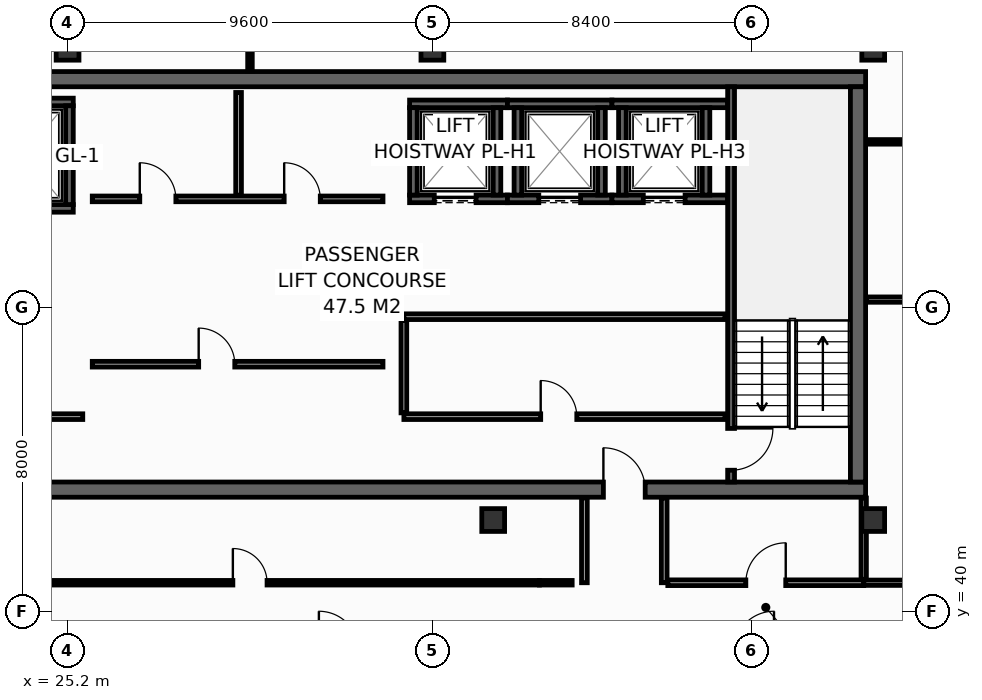
"""IFC4 building model, lengths in metres.
Left out: names, types, materials, properties, quantities, classifications, styles, units other than length and angle.
Written with IfcOpenShell. Run it as: python <this file> out.ifc"""

import sys

from ifc_helpers import new_model, si_unit, direction, frame, frame_2d, origin, origin_2d, place, context, subcontext, project, spatial, rectangle, hollow_rectangle, extrude, element, fill, save


model = new_model("IFC4")
c1 = context("Model", 3, precision=1e-05, world=origin(), true_north=direction((0.0, 1.0)))
c2 = subcontext(c1, "Body", "Model", "MODEL_VIEW")
j1 = project(units=[si_unit("LENGTHUNIT", "METRE"), si_unit("PLANEANGLEUNIT", "RADIAN")], contexts=[c1])
p1 = place(None, origin())
s1 = spatial("IfcSite", under=j1, at=p1, CompositionType="ELEMENT")
p2 = place(p1, origin())
s2 = spatial("IfcBuilding", under=s1, at=p2, CompositionType="ELEMENT")
p3 = place(p2, frame((0.0, 0.0, 272.4)))
s3 = spatial("IfcBuildingStorey", under=s2, at=p3, CompositionType="ELEMENT", Elevation=272.4)
p4 = place(p3, frame((13.7, 43.2, 0.0), z_axis=(0.0, 0.0, 1.0), x_axis=(1.0, 0.0, 0.0)))
e1 = element("IfcWall", 1, at=p4, inside=s3, PredefinedType="SHEAR", context=c2, shape_type="SweptSolid", body=[
    extrude(rectangle(XDim=32.5, YDim=0.4, at=frame_2d((16.25, 0.0))), origin(), (0.0, 0.0, 1.0), 3.35),
])
p5 = place(p4, frame((5.4, 0.0, 0.0)))
e2 = element("IfcOpeningElement", 2, at=p5, cuts=e1, PredefinedType="OPENING", context=c2, shape_type="SweptSolid", body=[
    extrude(rectangle(XDim=1.1, YDim=2.15, at=frame_2d((0.55, 1.075))), frame((0.0, 0.21, 0.0), z_axis=(0.0, -1.0, 0.0), x_axis=(1.0, 0.0, 0.0)), (0.0, 0.0, 1.0), 0.42),
])
p6 = place(p4, frame((25.6, 0.0, 0.0)))
e3 = element("IfcOpeningElement", 3, at=p6, cuts=e1, PredefinedType="OPENING", context=c2, shape_type="SweptSolid", body=[
    extrude(rectangle(XDim=1.1, YDim=2.15, at=frame_2d((0.55, 1.075))), frame((0.0, 0.21, 0.0), z_axis=(0.0, -1.0, 0.0), x_axis=(1.0, 0.0, 0.0)), (0.0, 0.0, 1.0), 0.42),
])
p7 = place(p3, frame((13.7, 54.0, 0.0), z_axis=(0.0, 0.0, 1.0), x_axis=(1.0, 0.0, 0.0)))
e4 = element("IfcWall", 4, at=p7, inside=s3, PredefinedType="SHEAR", context=c2, shape_type="SweptSolid", body=[
    extrude(rectangle(XDim=32.5, YDim=0.4, at=frame_2d((16.25, 0.0))), origin(), (0.0, 0.0, 1.0), 3.35),
])
p8 = place(p3, frame((46.0, 43.4, 0.0), z_axis=(0.0, 0.0, 1.0), x_axis=(0.0, 1.0, 0.0)))
e5 = element("IfcWall", 5, at=p8, inside=s3, PredefinedType="SHEAR", context=c2, shape_type="SweptSolid", body=[
    extrude(rectangle(XDim=10.4, YDim=0.4, at=frame_2d((5.2, 0.0))), origin(), (0.0, 0.0, 1.0), 3.35),
])
for number, where, z_axis, x_axis in (
    (6, (25.2, 54.8, 0.0), (0.0, 0.0, 1.0), (1.0, 0.0, 0.0)),
    (7, (34.8, 54.8, 0.0), (0.0, 0.0, 1.0), (1.0, 0.0, 0.0)),
    (8, (46.4, 54.8, 0.0), (0.0, 0.0, 1.0), (1.0, 0.0, 0.0)),
    (9, (36.4, 42.4, 0.0), (0.0, 0.0, 1.0), (1.0, 0.0, 0.0)),
    (10, (46.4, 42.4, 0.0), (0.0, 0.0, 1.0), (1.0, 0.0, 0.0)),
):
    element("IfcColumn", number, at=place(p3, frame(where, z_axis=z_axis, x_axis=x_axis)), inside=s3, PredefinedType="COLUMN", context=c2, shape_type="SweptSolid", body=[
        extrude(hollow_rectangle(XDim=0.6, YDim=0.6, WallThickness=0.028, at=origin_2d()), origin(), (0.0, 0.0, 1.0), 3.8),
    ])
p9 = place(p3, frame((22.5, 50.6, 0.0), z_axis=(0.0, 0.0, 1.0), x_axis=(1.0, 0.0, 0.0)))
e11 = element("IfcWall", 11, at=p9, inside=s3, PredefinedType="SHEAR", context=c2, shape_type="SweptSolid", body=[
    extrude(rectangle(XDim=2.85, YDim=0.2, at=frame_2d((1.425, 0.0))), origin(), (0.0, 0.0, 1.0), 3.35),
])
p10 = place(p9, frame((0.925, 0.0, 0.0)))
e12 = element("IfcOpeningElement", 12, at=p10, cuts=e11, PredefinedType="OPENING", context=c2, shape_type="SweptSolid", body=[
    extrude(rectangle(XDim=1.25, YDim=2.3, at=frame_2d((0.625, 1.15))), frame((0.0, 0.11, 0.0), z_axis=(0.0, -1.0, 0.0), x_axis=(1.0, 0.0, 0.0)), (0.0, 0.0, 1.0), 0.22),
])
p11 = place(p3, frame((22.5, 53.4, 0.0), z_axis=(0.0, 0.0, 1.0), x_axis=(1.0, 0.0, 0.0)))
e13 = element("IfcWall", 13, at=p11, inside=s3, PredefinedType="SHEAR", context=c2, shape_type="SweptSolid", body=[
    extrude(rectangle(XDim=2.85, YDim=0.2, at=frame_2d((1.425, 0.0))), origin(), (0.0, 0.0, 1.0), 3.35),
])
p12 = place(p3, frame((25.25, 50.7, 0.0), z_axis=(0.0, 0.0, 1.0), x_axis=(0.0, 1.0, 0.0)))
e14 = element("IfcWall", 14, at=p12, inside=s3, PredefinedType="SHEAR", context=c2, shape_type="SweptSolid", body=[
    extrude(rectangle(XDim=2.6, YDim=0.2, at=frame_2d((1.3, 0.0))), origin(), (0.0, 0.0, 1.0), 3.35),
])
p13 = place(p3, frame((34.2, 50.85, 0.0), z_axis=(0.0, 0.0, 1.0), x_axis=(1.0, 0.0, 0.0)))
e15 = element("IfcWall", 15, at=p13, inside=s3, PredefinedType="SHEAR", context=c2, shape_type="SweptSolid", body=[
    extrude(rectangle(XDim=2.575, YDim=0.2, at=frame_2d((1.288, 0.0))), origin(), (0.0, 0.0, 1.0), 3.35),
])
p14 = place(p13, frame((0.65, 0.0, 0.0)))
e16 = element("IfcOpeningElement", 16, at=p14, cuts=e15, PredefinedType="OPENING", context=c2, shape_type="SweptSolid", body=[
    extrude(rectangle(XDim=1.1, YDim=2.2, at=frame_2d((0.55, 1.1))), frame((0.0, 0.11, 0.0), z_axis=(0.0, -1.0, 0.0), x_axis=(1.0, 0.0, 0.0)), (0.0, 0.0, 1.0), 0.22),
])
p15 = place(p3, frame((34.2, 53.35, 0.0), z_axis=(0.0, 0.0, 1.0), x_axis=(1.0, 0.0, 0.0)))
e17 = element("IfcWall", 17, at=p15, inside=s3, PredefinedType="SHEAR", context=c2, shape_type="SweptSolid", body=[
    extrude(rectangle(XDim=2.575, YDim=0.2, at=frame_2d((1.288, 0.0))), origin(), (0.0, 0.0, 1.0), 3.35),
])
for number, where, z_axis, x_axis in (
    (18, (34.3, 50.95, 0.0), (0.0, 0.0, 1.0), (0.0, 1.0, 0.0)),
    (19, (36.5, 50.95, 0.0), (0.0, 0.0, 1.0), (0.0, 1.0, 0.0)),
):
    element("IfcWall", number, at=place(p3, frame(where, z_axis=z_axis, x_axis=x_axis)), inside=s3, PredefinedType="SHEAR", context=c2, shape_type="SweptSolid", body=[
        extrude(rectangle(XDim=2.3, YDim=0.2, at=frame_2d((1.15, 0.0))), origin(), (0.0, 0.0, 1.0), 3.35),
    ])
p16 = place(p3, frame((36.775, 50.85, 0.0), z_axis=(0.0, 0.0, 1.0), x_axis=(1.0, 0.0, 0.0)))
e20 = element("IfcWall", 20, at=p16, inside=s3, PredefinedType="SHEAR", context=c2, shape_type="SweptSolid", body=[
    extrude(rectangle(XDim=2.75, YDim=0.2, at=frame_2d((1.375, 0.0))), origin(), (0.0, 0.0, 1.0), 3.35),
])
p17 = place(p16, frame((0.825, 0.0, 0.0)))
e21 = element("IfcOpeningElement", 21, at=p17, cuts=e20, PredefinedType="OPENING", context=c2, shape_type="SweptSolid", body=[
    extrude(rectangle(XDim=1.1, YDim=2.2, at=frame_2d((0.55, 1.1))), frame((0.0, 0.11, 0.0), z_axis=(0.0, -1.0, 0.0), x_axis=(1.0, 0.0, 0.0)), (0.0, 0.0, 1.0), 0.22),
])
p18 = place(p3, frame((36.775, 53.35, 0.0), z_axis=(0.0, 0.0, 1.0), x_axis=(1.0, 0.0, 0.0)))
e22 = element("IfcWall", 22, at=p18, inside=s3, PredefinedType="SHEAR", context=c2, shape_type="SweptSolid", body=[
    extrude(rectangle(XDim=2.75, YDim=0.2, at=frame_2d((1.375, 0.0))), origin(), (0.0, 0.0, 1.0), 3.35),
])
for number, where, z_axis, x_axis in (
    (23, (37.05, 50.95, 0.0), (0.0, 0.0, 1.0), (0.0, 1.0, 0.0)),
    (24, (39.25, 50.95, 0.0), (0.0, 0.0, 1.0), (0.0, 1.0, 0.0)),
):
    element("IfcWall", number, at=place(p3, frame(where, z_axis=z_axis, x_axis=x_axis)), inside=s3, PredefinedType="SHEAR", context=c2, shape_type="SweptSolid", body=[
        extrude(rectangle(XDim=2.3, YDim=0.2, at=frame_2d((1.15, 0.0))), origin(), (0.0, 0.0, 1.0), 3.35),
    ])
p19 = place(p3, frame((39.525, 50.85, 0.0), z_axis=(0.0, 0.0, 1.0), x_axis=(1.0, 0.0, 0.0)))
e25 = element("IfcWall", 25, at=p19, inside=s3, PredefinedType="SHEAR", context=c2, shape_type="SweptSolid", body=[
    extrude(rectangle(XDim=3.045, YDim=0.2, at=frame_2d((1.522, 0.0))), origin(), (0.0, 0.0, 1.0), 3.35),
])
p20 = place(p19, frame((0.825, 0.0, 0.0)))
e26 = element("IfcOpeningElement", 26, at=p20, cuts=e25, PredefinedType="OPENING", context=c2, shape_type="SweptSolid", body=[
    extrude(rectangle(XDim=1.1, YDim=2.2, at=frame_2d((0.55, 1.1))), frame((0.0, 0.11, 0.0), z_axis=(0.0, -1.0, 0.0), x_axis=(1.0, 0.0, 0.0)), (0.0, 0.0, 1.0), 0.22),
])
p21 = place(p3, frame((39.525, 53.35, 0.0), z_axis=(0.0, 0.0, 1.0), x_axis=(1.0, 0.0, 0.0)))
e27 = element("IfcWall", 27, at=p21, inside=s3, PredefinedType="SHEAR", context=c2, shape_type="SweptSolid", body=[
    extrude(rectangle(XDim=3.045, YDim=0.2, at=frame_2d((1.522, 0.0))), origin(), (0.0, 0.0, 1.0), 3.35),
])
for number, where, z_axis, x_axis in (
    (28, (39.8, 50.95, 0.0), (0.0, 0.0, 1.0), (0.0, 1.0, 0.0)),
    (29, (42.0, 50.95, 0.0), (0.0, 0.0, 1.0), (0.0, 1.0, 0.0)),
):
    element("IfcWall", number, at=place(p3, frame(where, z_axis=z_axis, x_axis=x_axis)), inside=s3, PredefinedType="SHEAR", context=c2, shape_type="SweptSolid", body=[
        extrude(rectangle(XDim=2.3, YDim=0.2, at=frame_2d((1.15, 0.0))), origin(), (0.0, 0.0, 1.0), 3.35),
    ])
p22 = place(p3, frame((42.66, 53.8, 0.0), z_axis=(0.0, 0.0, 1.0), x_axis=(0.0, -1.0, 0.0)))
e30 = element("IfcWall", 30, at=p22, inside=s3, PredefinedType="SHEAR", context=c2, shape_type="SweptSolid", body=[
    extrude(rectangle(XDim=10.4, YDim=0.18, at=frame_2d((5.2, 0.0))), origin(), (0.0, 0.0, 1.0), 3.35),
])
p23 = place(p22, frame((8.99, 0.0, 0.0)))
e31 = element("IfcOpeningElement", 31, at=p23, cuts=e30, PredefinedType="OPENING", context=c2, shape_type="SweptSolid", body=[
    extrude(rectangle(XDim=1.1, YDim=2.15, at=frame_2d((0.55, 1.075))), frame((0.0, 0.1, 0.0), z_axis=(0.0, -1.0, 0.0), x_axis=(1.0, 0.0, 0.0)), (0.0, 0.0, 1.0), 0.2),
])
p24 = place(p3, frame((22.68, 45.12, 0.0), z_axis=(0.0, 0.0, 1.0), x_axis=(1.0, 0.0, 0.0)))
e32 = element("IfcWall", 32, at=p24, inside=s3, PredefinedType="PARTITIONING", context=c2, shape_type="SweptSolid", body=[
    extrude(rectangle(XDim=2.92, YDim=0.15, at=frame_2d((1.46, 0.0))), origin(), (0.0, 0.0, 1.0), 3.35),
])
p25 = place(p24, frame((0.85, 0.0, 0.0)))
e33 = element("IfcOpeningElement", 33, at=p25, cuts=e32, PredefinedType="OPENING", context=c2, shape_type="SweptSolid", body=[
    extrude(rectangle(XDim=1.1, YDim=2.15, at=frame_2d((0.55, 1.075))), frame((0.0, 0.085, 0.0), z_axis=(0.0, -1.0, 0.0), x_axis=(1.0, 0.0, 0.0)), (0.0, 0.0, 1.0), 0.17),
])
p26 = place(p3, frame((34.05, 45.12, 0.0), z_axis=(0.0, 0.0, 1.0), x_axis=(1.0, 0.0, 0.0)))
e34 = element("IfcWall", 34, at=p26, inside=s3, PredefinedType="PARTITIONING", context=c2, shape_type="SweptSolid", body=[
    extrude(rectangle(XDim=8.45, YDim=0.15, at=frame_2d((4.225, 0.0))), origin(), (0.0, 0.0, 1.0), 3.35),
])
p27 = place(p26, frame((3.6, 0.0, 0.0)))
e35 = element("IfcOpeningElement", 35, at=p27, cuts=e34, PredefinedType="OPENING", context=c2, shape_type="SweptSolid", body=[
    extrude(rectangle(XDim=0.95, YDim=2.15, at=frame_2d((0.475, 1.075))), frame((0.0, 0.085, 0.0), z_axis=(0.0, -1.0, 0.0), x_axis=(1.0, 0.0, 0.0)), (0.0, 0.0, 1.0), 0.17),
])
p28 = place(p3, frame((34.05, 47.75, 0.0), z_axis=(0.0, 0.0, 1.0), x_axis=(1.0, 0.0, 0.0)))
e36 = element("IfcWall", 36, at=p28, inside=s3, PredefinedType="PARTITIONING", context=c2, shape_type="SweptSolid", body=[
    extrude(rectangle(XDim=8.45, YDim=0.15, at=frame_2d((4.225, 0.0))), origin(), (0.0, 0.0, 1.0), 3.35),
])
p29 = place(p3, frame((34.05, 45.22, 0.0), z_axis=(0.0, 0.0, 1.0), x_axis=(0.0, 1.0, 0.0)))
e37 = element("IfcWall", 37, at=p29, inside=s3, PredefinedType="PARTITIONING", context=c2, shape_type="SweptSolid", body=[
    extrude(rectangle(XDim=2.43, YDim=0.15, at=frame_2d((1.215, 0.0))), origin(), (0.0, 0.0, 1.0), 3.35),
])
p30 = place(p3, frame((25.85, 50.85, 0.0), z_axis=(0.0, 0.0, 1.0), x_axis=(1.0, 0.0, 0.0)))
e38 = element("IfcWall", 38, at=p30, inside=s3, PredefinedType="PARTITIONING", context=c2, shape_type="SweptSolid", body=[
    extrude(rectangle(XDim=7.65, YDim=0.15, at=frame_2d((3.825, 0.0))), origin(), (0.0, 0.0, 1.0), 3.35),
])
p31 = place(p30, frame((1.25, 0.0, 0.0)))
e39 = element("IfcOpeningElement", 39, at=p31, cuts=e38, PredefinedType="OPENING", context=c2, shape_type="SweptSolid", body=[
    extrude(rectangle(XDim=0.95, YDim=2.15, at=frame_2d((0.475, 1.075))), frame((0.0, 0.085, 0.0), z_axis=(0.0, -1.0, 0.0), x_axis=(1.0, 0.0, 0.0)), (0.0, 0.0, 1.0), 0.17),
])
p32 = place(p30, frame((5.05, 0.0, 0.0)))
e40 = element("IfcOpeningElement", 40, at=p32, cuts=e38, PredefinedType="OPENING", context=c2, shape_type="SweptSolid", body=[
    extrude(rectangle(XDim=0.95, YDim=2.15, at=frame_2d((0.475, 1.075))), frame((0.0, 0.085, 0.0), z_axis=(0.0, -1.0, 0.0), x_axis=(1.0, 0.0, 0.0)), (0.0, 0.0, 1.0), 0.17),
])
p33 = place(p3, frame((29.7, 50.95, 0.0), z_axis=(0.0, 0.0, 1.0), x_axis=(0.0, 1.0, 0.0)))
e41 = element("IfcWall", 41, at=p33, inside=s3, PredefinedType="PARTITIONING", context=c2, shape_type="SweptSolid", body=[
    extrude(rectangle(XDim=2.7, YDim=0.15, at=frame_2d((1.35, 0.0))), origin(), (0.0, 0.0, 1.0), 3.35),
])
p34 = place(p3, frame((25.85, 46.5, 0.0), z_axis=(0.0, 0.0, 1.0), x_axis=(1.0, 0.0, 0.0)))
e42 = element("IfcWall", 42, at=p34, inside=s3, PredefinedType="PARTITIONING", context=c2, shape_type="SweptSolid", body=[
    extrude(rectangle(XDim=7.65, YDim=0.15, at=frame_2d((3.825, 0.0))), origin(), (0.0, 0.0, 1.0), 3.35),
])
p35 = place(p34, frame((2.8, 0.0, 0.0)))
e43 = element("IfcOpeningElement", 43, at=p35, cuts=e42, PredefinedType="OPENING", context=c2, shape_type="SweptSolid", body=[
    extrude(rectangle(XDim=0.95, YDim=2.15, at=frame_2d((0.475, 1.075))), frame((0.0, 0.085, 0.0), z_axis=(0.0, -1.0, 0.0), x_axis=(1.0, 0.0, 0.0)), (0.0, 0.0, 1.0), 0.17),
])
p36 = place(p3, frame((46.15, 40.75, 0.0), z_axis=(0.0, 0.0, 1.0), x_axis=(1.0, 0.0, 0.0)))
e44 = element("IfcWall", 44, at=p36, inside=s3, PredefinedType="PARTITIONING", context=c2, shape_type="SweptSolid", body=[
    extrude(rectangle(XDim=4.05, YDim=0.14, at=frame_2d((2.025, 0.0))), origin(), (0.0, 0.0, 1.0), 3.35),
])
p37 = place(p3, frame((46.15, 40.84, 0.0), z_axis=(0.0, 0.0, 1.0), x_axis=(0.0, 1.0, 0.0)))
e45 = element("IfcWall", 45, at=p37, inside=s3, PredefinedType="PARTITIONING", context=c2, shape_type="SweptSolid", body=[
    extrude(rectangle(XDim=2.14, YDim=0.14, at=frame_2d((1.07, 0.0))), origin(), (0.0, 0.0, 1.0), 3.35),
])
p38 = place(p3, frame((46.22, 48.2, 0.0), z_axis=(0.0, 0.0, 1.0), x_axis=(1.0, 0.0, 0.0)))
e46 = element("IfcWall", 46, at=p38, inside=s3, PredefinedType="PARTITIONING", context=c2, shape_type="SweptSolid", body=[
    extrude(rectangle(XDim=3.98, YDim=0.14, at=frame_2d((1.99, 0.0))), origin(), (0.0, 0.0, 1.0), 3.35),
])
p39 = place(p3, frame((46.22, 52.35, 0.0), z_axis=(0.0, 0.0, 1.0), x_axis=(1.0, 0.0, 0.0)))
e47 = element("IfcWall", 47, at=p39, inside=s3, PredefinedType="PARTITIONING", context=c2, shape_type="SweptSolid", body=[
    extrude(rectangle(XDim=3.98, YDim=0.12, at=frame_2d((1.99, 0.0))), origin(), (0.0, 0.0, 1.0), 3.35),
])
p40 = place(p3, frame((30.0, 54.22, 0.0), z_axis=(0.0, 0.0, 1.0), x_axis=(0.0, 1.0, 0.0)))
e48 = element("IfcWall", 48, at=p40, inside=s3, PredefinedType="PARTITIONING", context=c2, shape_type="SweptSolid", body=[
    extrude(rectangle(XDim=1.775, YDim=0.12, at=frame_2d((0.888, 0.0))), origin(), (0.0, 0.0, 1.0), 2.735),
])
for number, where, z_axis, x_axis in (
    (49, (38.8, 40.75, 0.0), (0.0, 0.0, 1.0), (0.0, 1.0, 0.0)),
    (50, (40.9, 40.75, 0.0), (0.0, 0.0, 1.0), (0.0, 1.0, 0.0)),
):
    element("IfcWall", number, at=place(p3, frame(where, z_axis=z_axis, x_axis=x_axis)), inside=s3, PredefinedType="PARTITIONING", context=c2, shape_type="SweptSolid", body=[
        extrude(rectangle(XDim=2.23, YDim=0.15, at=frame_2d((1.115, 0.0))), origin(), (0.0, 0.0, 1.0), 3.35),
    ])
p41 = place(p3, frame((22.384, 40.75, 0.0), z_axis=(0.0, 0.0, 1.0), x_axis=(1.0, 0.0, 0.0)))
e51 = element("IfcWall", 51, at=p41, inside=s3, PredefinedType="PARTITIONING", context=c2, shape_type="SweptSolid", body=[
    extrude(rectangle(XDim=15.232, YDim=0.12, at=frame_2d((7.616, 0.0))), origin(), (0.0, 0.0, 1.0), 3.35),
])
p42 = place(p41, frame((7.166, 0.0, 0.0)))
e52 = element("IfcOpeningElement", 52, at=p42, cuts=e51, PredefinedType="OPENING", context=c2, shape_type="SweptSolid", body=[
    extrude(rectangle(XDim=0.9, YDim=2.1, at=frame_2d((0.45, 1.05))), frame((0.0, 0.07, 0.0), z_axis=(0.0, -1.0, 0.0), x_axis=(1.0, 0.0, 0.0)), (0.0, 0.0, 1.0), 0.14),
])
p43 = place(p3, frame((37.616, 40.75, 0.0), z_axis=(0.0, 0.0, 1.0), x_axis=(1.0, 0.0, 0.0)))
e53 = element("IfcWall", 53, at=p43, inside=s3, PredefinedType="PARTITIONING", context=c2, shape_type="SweptSolid", body=[
    extrude(rectangle(XDim=0.862, YDim=0.12, at=frame_2d((0.431, 0.0))), origin(), (0.0, 0.0, 1.0), 1.935),
])
p44 = place(p3, frame((40.995, 40.75, 0.0), z_axis=(0.0, 0.0, 1.0), x_axis=(1.0, 0.0, 0.0)))
e54 = element("IfcWall", 54, at=p44, inside=s3, PredefinedType="PARTITIONING", context=c2, shape_type="SweptSolid", body=[
    extrude(rectangle(XDim=5.155, YDim=0.15, at=frame_2d((2.577, 0.0))), origin(), (0.0, 0.0, 1.0), 3.35),
])
p45 = place(p44, frame((2.053, 0.0, 0.0)))
e55 = element("IfcOpeningElement", 55, at=p45, cuts=e54, PredefinedType="OPENING", context=c2, shape_type="SweptSolid", body=[
    extrude(rectangle(XDim=1.05, YDim=2.15, at=frame_2d((0.525, 1.075))), frame((0.0, 0.085, 0.0), z_axis=(0.0, -1.0, 0.0), x_axis=(1.0, 0.0, 0.0)), (0.0, 0.0, 1.0), 0.17),
])
p46 = place(p14, origin())
e56 = element("IfcDoor", 56, at=p46, inside=s3, OperationType="SLIDING_TO_LEFT", PredefinedType="DOOR", context=c2, shape_type="SweptSolid", body=[
    extrude(rectangle(XDim=1.1, YDim=2.2, at=frame_2d((0.55, 1.1))), frame((0.0, 0.025, 0.0), z_axis=(0.0, -1.0, 0.0), x_axis=(1.0, 0.0, 0.0)), (0.0, 0.0, 1.0), 0.05),
])
fill(e16, e56)
p47 = place(p17, origin())
e57 = element("IfcDoor", 57, at=p47, inside=s3, OperationType="SLIDING_TO_LEFT", PredefinedType="DOOR", context=c2, shape_type="SweptSolid", body=[
    extrude(rectangle(XDim=1.1, YDim=2.2, at=frame_2d((0.55, 1.1))), frame((0.0, 0.025, 0.0), z_axis=(0.0, -1.0, 0.0), x_axis=(1.0, 0.0, 0.0)), (0.0, 0.0, 1.0), 0.05),
])
fill(e21, e57)
p48 = place(p20, origin())
e58 = element("IfcDoor", 58, at=p48, inside=s3, OperationType="SLIDING_TO_LEFT", PredefinedType="DOOR", context=c2, shape_type="SweptSolid", body=[
    extrude(rectangle(XDim=1.1, YDim=2.2, at=frame_2d((0.55, 1.1))), frame((0.0, 0.025, 0.0), z_axis=(0.0, -1.0, 0.0), x_axis=(1.0, 0.0, 0.0)), (0.0, 0.0, 1.0), 0.05),
])
fill(e26, e58)
p49 = place(p23, origin())
e59 = element("IfcDoor", 59, at=p49, inside=s3, OperationType="SINGLE_SWING_LEFT", PredefinedType="DOOR", context=c2, shape_type="SweptSolid", body=[
    extrude(rectangle(XDim=1.1, YDim=2.15, at=frame_2d((0.55, 1.075))), frame((0.0, 0.025, 0.0), z_axis=(0.0, -1.0, 0.0), x_axis=(1.0, 0.0, 0.0)), (0.0, 0.0, 1.0), 0.05),
])
fill(e31, e59)
p50 = place(p6, origin())
e60 = element("IfcDoor", 60, at=p50, inside=s3, OperationType="SINGLE_SWING_LEFT", PredefinedType="DOOR", context=c2, shape_type="SweptSolid", body=[
    extrude(rectangle(XDim=1.1, YDim=2.15, at=frame_2d((0.55, 1.075))), frame((0.0, 0.025, 0.0), z_axis=(0.0, -1.0, 0.0), x_axis=(1.0, 0.0, 0.0)), (0.0, 0.0, 1.0), 0.05),
])
fill(e3, e60)
p51 = place(p27, origin())
e61 = element("IfcDoor", 61, at=p51, inside=s3, OperationType="SINGLE_SWING_LEFT", PredefinedType="DOOR", context=c2, shape_type="SweptSolid", body=[
    extrude(rectangle(XDim=0.95, YDim=2.15, at=frame_2d((0.475, 1.075))), frame((0.0, 0.025, 0.0), z_axis=(0.0, -1.0, 0.0), x_axis=(1.0, 0.0, 0.0)), (0.0, 0.0, 1.0), 0.05),
])
fill(e35, e61)
p52 = place(p31, origin())
e62 = element("IfcDoor", 62, at=p52, inside=s3, OperationType="SINGLE_SWING_LEFT", PredefinedType="DOOR", context=c2, shape_type="SweptSolid", body=[
    extrude(rectangle(XDim=0.95, YDim=2.15, at=frame_2d((0.475, 1.075))), frame((0.0, 0.025, 0.0), z_axis=(0.0, -1.0, 0.0), x_axis=(1.0, 0.0, 0.0)), (0.0, 0.0, 1.0), 0.05),
])
fill(e39, e62)
p53 = place(p32, origin())
e63 = element("IfcDoor", 63, at=p53, inside=s3, OperationType="SINGLE_SWING_LEFT", PredefinedType="DOOR", context=c2, shape_type="SweptSolid", body=[
    extrude(rectangle(XDim=0.95, YDim=2.15, at=frame_2d((0.475, 1.075))), frame((0.0, 0.025, 0.0), z_axis=(0.0, -1.0, 0.0), x_axis=(1.0, 0.0, 0.0)), (0.0, 0.0, 1.0), 0.05),
])
fill(e40, e63)
p54 = place(p35, origin())
e64 = element("IfcDoor", 64, at=p54, inside=s3, OperationType="SINGLE_SWING_LEFT", PredefinedType="DOOR", context=c2, shape_type="SweptSolid", body=[
    extrude(rectangle(XDim=0.95, YDim=2.15, at=frame_2d((0.475, 1.075))), frame((0.0, 0.025, 0.0), z_axis=(0.0, -1.0, 0.0), x_axis=(1.0, 0.0, 0.0)), (0.0, 0.0, 1.0), 0.05),
])
fill(e43, e64)
p55 = place(p42, origin())
e65 = element("IfcDoor", 65, at=p55, inside=s3, OperationType="SINGLE_SWING_LEFT", PredefinedType="DOOR", context=c2, shape_type="SweptSolid", body=[
    extrude(rectangle(XDim=0.9, YDim=2.1, at=frame_2d((0.45, 1.05))), frame((0.0, 0.025, 0.0), z_axis=(0.0, -1.0, 0.0), x_axis=(1.0, 0.0, 0.0)), (0.0, 0.0, 1.0), 0.05),
])
fill(e52, e65)
p56 = place(p45, origin())
e66 = element("IfcDoor", 66, at=p56, inside=s3, OperationType="SINGLE_SWING_RIGHT", PredefinedType="DOOR", context=c2, shape_type="SweptSolid", body=[
    extrude(rectangle(XDim=1.05, YDim=2.15, at=frame_2d((0.525, 1.075))), frame((0.0, 0.025, 0.0), z_axis=(0.0, -1.0, 0.0), x_axis=(1.0, 0.0, 0.0)), (0.0, 0.0, 1.0), 0.05),
])
fill(e55, e66)
save(model, sys.argv[1])
